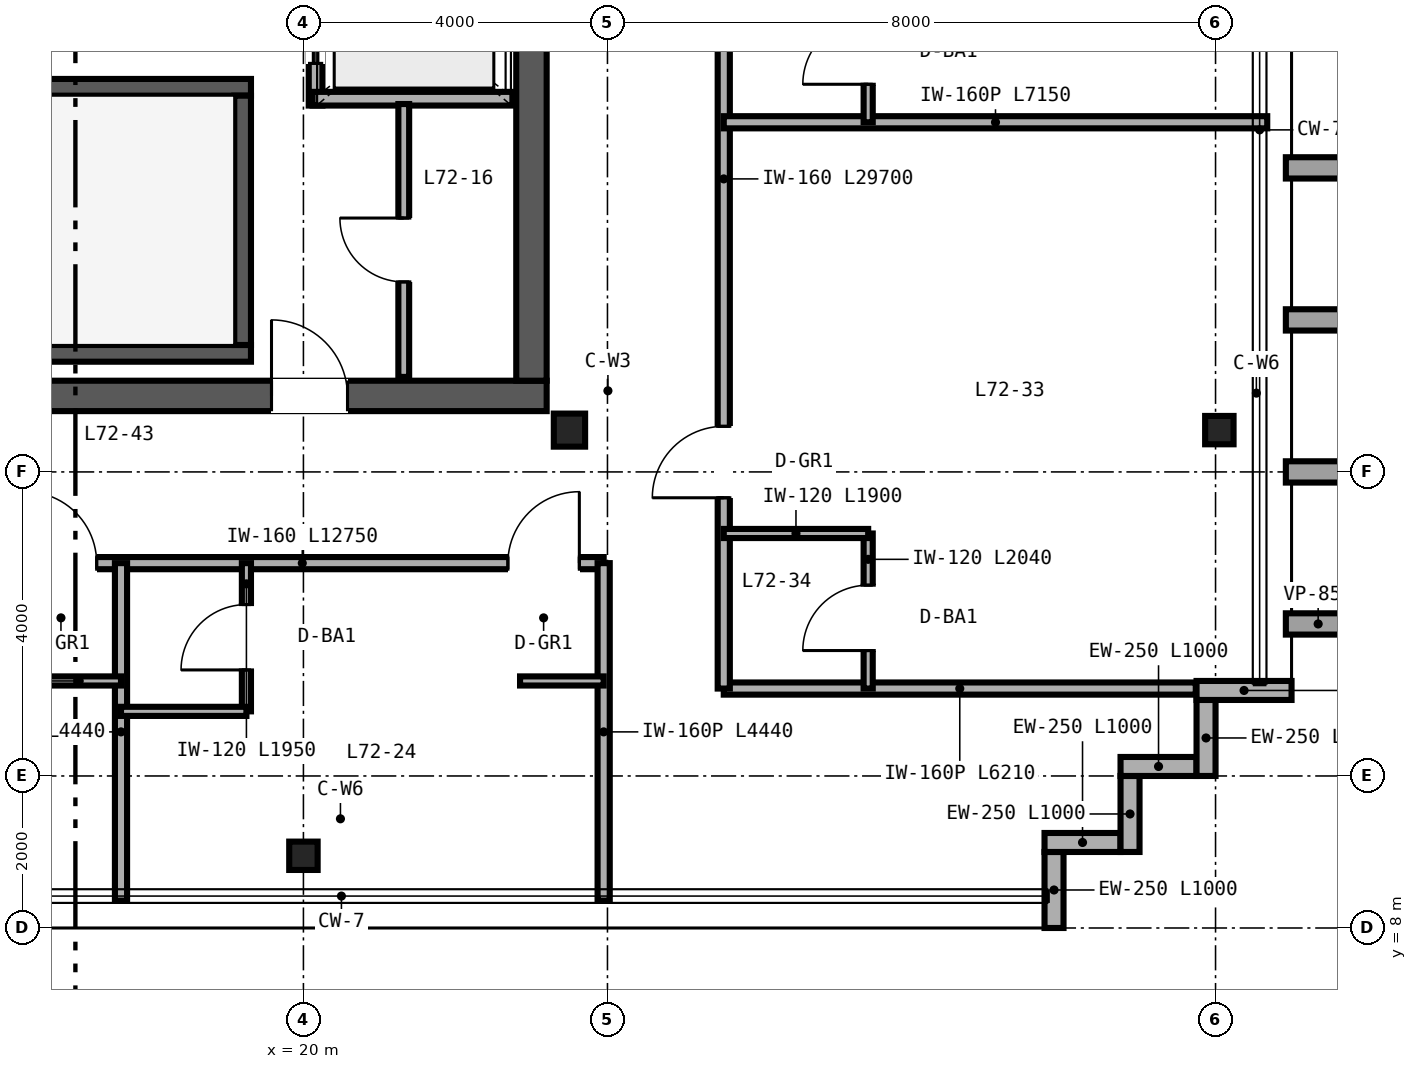
"""IFC4 building model, lengths in metres.
Left out: names, types, materials, properties, quantities, classifications, styles, units other than length and angle.
Written with IfcOpenShell. Run it as: python <this file> out.ifc"""

import sys

from ifc_helpers import new_model, si_unit, direction, frame, frame_2d, origin, origin_2d, place, context, subcontext, project, spatial, rectangle, i_section, extrude, source, transform, mapped, element, fill, save


model = new_model("IFC4")
c1 = context("Model", 3, precision=1e-05, world=origin(), true_north=direction((0.0, 1.0)))
c2 = subcontext(c1, "Body", "Model", "MODEL_VIEW")
j1 = project(units=[si_unit("LENGTHUNIT", "METRE"), si_unit("PLANEANGLEUNIT", "RADIAN")], contexts=[c1])
p1 = place(None, origin())
s1 = spatial("IfcSite", under=j1, at=p1, CompositionType="ELEMENT")
p2 = place(p1, origin())
s2 = spatial("IfcBuilding", under=s1, at=p2, CompositionType="ELEMENT")
p3 = place(p2, frame((0.0, 0.0, 283.2)))
s3 = spatial("IfcBuildingStorey", under=s2, at=p3, CompositionType="ELEMENT", Elevation=283.2)
p4 = place(p3, frame((10.8, 15.0, 0.0), z_axis=(0.0, 0.0, 1.0), x_axis=(1.0, 0.0, 0.0)))
e1 = element("IfcWall", 1, at=p4, inside=s3, PredefinedType="SHEAR", context=c2, shape_type="SweptSolid", body=[
    extrude(rectangle(XDim=12.4, YDim=0.4, at=frame_2d((6.2, 0.0))), origin(), (0.0, 0.0, 1.0), 3.38),
])
p5 = place(p4, frame((8.78, 0.0, 0.0)))
e2 = element("IfcOpeningElement", 2, at=p5, cuts=e1, PredefinedType="OPENING", context=c2, shape_type="SweptSolid", body=[
    extrude(rectangle(XDim=1.0, YDim=2.15, at=frame_2d((0.5, 1.075))), frame((0.0, 0.21, 0.0), z_axis=(0.0, -1.0, 0.0), x_axis=(1.0, 0.0, 0.0)), (0.0, 0.0, 1.0), 0.42),
])
p6 = place(p3, frame((23.0, 15.2, 0.0), z_axis=(0.0, 0.0, 1.0), x_axis=(0.0, 1.0, 0.0)))
e3 = element("IfcWall", 3, at=p6, inside=s3, PredefinedType="SHEAR", context=c2, shape_type="SweptSolid", body=[
    extrude(rectangle(XDim=21.6, YDim=0.4, at=frame_2d((10.8, 0.0))), origin(), (0.0, 0.0, 1.0), 3.38),
])
p7 = place(p3, frame((11.2, 15.56, 0.0), z_axis=(0.0, 0.0, 1.0), x_axis=(1.0, 0.0, 0.0)))
e4 = element("IfcWall", 4, at=p7, inside=s3, PredefinedType="SHEAR", context=c2, shape_type="SweptSolid", body=[
    extrude(rectangle(XDim=8.11, YDim=0.22, at=frame_2d((4.055, 0.0))), origin(), (0.0, 0.0, 1.0), 3.4),
])
p8 = place(p3, frame((11.2, 19.06, 0.0), z_axis=(0.0, 0.0, 1.0), x_axis=(1.0, 0.0, 0.0)))
e5 = element("IfcWall", 5, at=p8, inside=s3, PredefinedType="SHEAR", context=c2, shape_type="SweptSolid", body=[
    extrude(rectangle(XDim=8.11, YDim=0.22, at=frame_2d((4.055, 0.0))), origin(), (0.0, 0.0, 1.0), 3.4),
])
p9 = place(p8, frame((0.72, 0.0, 0.0)))
e6 = element("IfcOpeningElement", 6, at=p9, cuts=e5, PredefinedType="OPENING", context=c2, shape_type="SweptSolid", body=[
    extrude(rectangle(XDim=1.05, YDim=2.15, at=frame_2d((0.525, 1.075))), frame((0.0, 0.12, 0.0), z_axis=(0.0, -1.0, 0.0), x_axis=(1.0, 0.0, 0.0)), (0.0, 0.0, 1.0), 0.24),
])
p10 = place(p3, frame((19.2, 15.67, 0.0), z_axis=(0.0, 0.0, 1.0), x_axis=(0.0, 1.0, 0.0)))
e7 = element("IfcWall", 7, at=p10, inside=s3, PredefinedType="SHEAR", context=c2, shape_type="SweptSolid", body=[
    extrude(rectangle(XDim=3.28, YDim=0.22, at=frame_2d((1.64, 0.0))), origin(), (0.0, 0.0, 1.0), 3.4),
])
m1 = source(origin(), c2, "Body", "SweptSolid", [
    extrude(i_section(OverallWidth=0.412, OverallDepth=0.435, WebThickness=0.036, FlangeThickness=0.057, FilletRadius=0.025, at=origin_2d()), origin(), (0.0, 0.0, 1.0), 3.38),
])
p11 = place(p3, frame((23.5, 14.55, 0.0), z_axis=(0.0, 0.0, 1.0), x_axis=(1.0, 0.0, 0.0)))
e8 = element("IfcColumn", 8, at=p11, inside=s3, PredefinedType="COLUMN", context=c2, shape_type="MappedRepresentation", body=[
    mapped(m1, transform((0.0, 0.0, 0.0), scale=1.0)),
])
m2 = source(origin(), c2, "Body", "SweptSolid", [
    extrude(i_section(OverallWidth=0.374, OverallDepth=0.373, WebThickness=0.016, FlangeThickness=0.026, FilletRadius=0.025, at=origin_2d()), origin(), (0.0, 0.0, 1.0), 3.38),
])
for number, where, z_axis, x_axis in (
    (9, (20.0, 8.95, 0.0), (0.0, 0.0, 1.0), (1.0, 0.0, 0.0)),
    (10, (32.05, 14.55, 0.0), (0.0, 0.0, 1.0), (1.0, 0.0, 0.0)),
):
    element("IfcColumn", number, at=place(p3, frame(where, z_axis=z_axis, x_axis=x_axis)), inside=s3, PredefinedType="COLUMN", context=c2, shape_type="MappedRepresentation", body=[
        mapped(m2, transform((0.0, 0.0, 0.0), scale=1.0)),
    ])
for number, where, z_axis, x_axis in (
    (11, (29.875, 8.0, 0.0), (0.0, 0.0, 1.0), (0.0, 1.0, 0.0)),
    (12, (29.75, 9.125, 0.0), (0.0, 0.0, 1.0), (1.0, 0.0, 0.0)),
    (13, (30.875, 9.0, 0.0), (0.0, 0.0, 1.0), (0.0, 1.0, 0.0)),
    (14, (30.75, 10.125, 0.0), (0.0, 0.0, 1.0), (1.0, 0.0, 0.0)),
    (15, (31.875, 10.0, 0.0), (0.0, 0.0, 1.0), (0.0, 1.0, 0.0)),
):
    element("IfcWall", number, at=place(p3, frame(where, z_axis=z_axis, x_axis=x_axis)), inside=s3, PredefinedType="SOLIDWALL", context=c2, shape_type="SweptSolid", body=[
        extrude(rectangle(XDim=1.0, YDim=0.25, at=frame_2d((0.5, 0.0))), origin(), (0.0, 0.0, 1.0), 3.38),
    ])
p12 = place(p3, frame((31.75, 11.125, 0.0), z_axis=(0.0, 0.0, 1.0), x_axis=(1.0, 0.0, 0.0)))
e16 = element("IfcWall", 16, at=p12, inside=s3, PredefinedType="SOLIDWALL", context=c2, shape_type="SweptSolid", body=[
    extrude(rectangle(XDim=1.25, YDim=0.25, at=frame_2d((0.625, 0.0))), origin(), (0.0, 0.0, 1.0), 3.38),
])
p13 = place(p3, frame((20.16, 18.82, 0.0), z_axis=(0.0, 0.0, 1.0), x_axis=(0.0, 1.0, 0.0)))
e17 = element("IfcWall", 17, at=p13, inside=s3, PredefinedType="SOLIDWALL", context=c2, shape_type="SweptSolid", body=[
    extrude(rectangle(XDim=6.32, YDim=0.18, at=frame_2d((3.16, 0.0))), origin(), (0.0, 0.0, 1.0), 2.48),
])
p14 = place(p13, frame((0.555, 0.0, 0.0)))
e18 = element("IfcOpeningElement", 18, at=p14, cuts=e17, PredefinedType="OPENING", context=c2, shape_type="SweptSolid", body=[
    extrude(rectangle(XDim=1.1, YDim=2.2, at=frame_2d((0.55, 1.1))), frame((0.0, 0.1, 0.0), z_axis=(0.0, -1.0, 0.0), x_axis=(1.0, 0.0, 0.0)), (0.0, 0.0, 1.0), 0.2),
])
p15 = place(p13, frame((2.635, 0.0, 0.0)))
e19 = element("IfcOpeningElement", 19, at=p15, cuts=e17, PredefinedType="OPENING", context=c2, shape_type="SweptSolid", body=[
    extrude(rectangle(XDim=1.1, YDim=2.2, at=frame_2d((0.55, 1.1))), frame((0.0, 0.1, 0.0), z_axis=(0.0, -1.0, 0.0), x_axis=(1.0, 0.0, 0.0)), (0.0, 0.0, 1.0), 0.2),
])
p16 = place(p13, frame((4.69, 0.0, 0.0)))
e20 = element("IfcOpeningElement", 20, at=p16, cuts=e17, PredefinedType="OPENING", context=c2, shape_type="SweptSolid", body=[
    extrude(rectangle(XDim=1.1, YDim=2.2, at=frame_2d((0.55, 1.1))), frame((0.0, 0.1, 0.0), z_axis=(0.0, -1.0, 0.0), x_axis=(1.0, 0.0, 0.0)), (0.0, 0.0, 1.0), 0.2),
])
p17 = place(p3, frame((20.12, 18.91, 0.0), z_axis=(0.0, 0.0, 1.0), x_axis=(1.0, 0.0, 0.0)))
e21 = element("IfcWall", 21, at=p17, inside=s3, PredefinedType="SOLIDWALL", context=c2, shape_type="SweptSolid", body=[
    extrude(rectangle(XDim=2.63, YDim=0.18, at=frame_2d((1.315, 0.0))), origin(), (0.0, 0.0, 1.0), 3.38),
])
p18 = place(p3, frame((21.32, 15.25, 0.0), z_axis=(0.0, 0.0, 1.0), x_axis=(0.0, 1.0, 0.0)))
e22 = element("IfcWall", 22, at=p18, inside=s3, PredefinedType="PARTITIONING", context=c2, shape_type="SweptSolid", body=[
    extrude(rectangle(XDim=3.59, YDim=0.142, at=frame_2d((1.795, 0.0))), origin(), (0.0, 0.0, 1.0), 3.38),
])
p19 = place(p18, frame((1.25, 0.0, 0.0)))
e23 = element("IfcOpeningElement", 23, at=p19, cuts=e22, PredefinedType="OPENING", context=c2, shape_type="SweptSolid", body=[
    extrude(rectangle(XDim=0.84, YDim=2.1, at=frame_2d((0.42, 1.05))), frame((0.0, 0.081, 0.0), z_axis=(0.0, -1.0, 0.0), x_axis=(1.0, 0.0, 0.0)), (0.0, 0.0, 1.0), 0.162),
])
p20 = place(p3, frame((11.2, 12.8, 0.0), z_axis=(0.0, 0.0, 1.0), x_axis=(1.0, 0.0, 0.0)))
e24 = element("IfcWall", 24, at=p20, inside=s3, PredefinedType="PARTITIONING", context=c2, shape_type="SweptSolid", body=[
    extrude(rectangle(XDim=12.75, YDim=0.16, at=frame_2d((6.375, 0.0))), origin(), (0.0, 0.0, 1.0), 3.38),
])
p21 = place(p20, frame((5.14, 0.0, 0.0)))
e25 = element("IfcOpeningElement", 25, at=p21, cuts=e24, PredefinedType="OPENING", context=c2, shape_type="SweptSolid", body=[
    extrude(rectangle(XDim=0.94, YDim=2.15, at=frame_2d((0.47, 1.075))), frame((0.0, 0.09, 0.0), z_axis=(0.0, -1.0, 0.0), x_axis=(1.0, 0.0, 0.0)), (0.0, 0.0, 1.0), 0.18),
])
p22 = place(p20, frame((11.49, 0.0, 0.0)))
e26 = element("IfcOpeningElement", 26, at=p22, cuts=e24, PredefinedType="OPENING", context=c2, shape_type="SweptSolid", body=[
    extrude(rectangle(XDim=0.94, YDim=2.15, at=frame_2d((0.47, 1.075))), frame((0.0, 0.09, 0.0), z_axis=(0.0, -1.0, 0.0), x_axis=(1.0, 0.0, 0.0)), (0.0, 0.0, 1.0), 0.18),
])
p23 = place(p3, frame((23.95, 8.36, 0.0), z_axis=(0.0, 0.0, 1.0), x_axis=(0.0, 1.0, 0.0)))
e27 = element("IfcWall", 27, at=p23, inside=s3, PredefinedType="PARTITIONING", context=c2, shape_type="SweptSolid", body=[
    extrude(rectangle(XDim=4.44, YDim=0.16, at=frame_2d((2.22, 0.0))), origin(), (0.0, 0.0, 1.0), 3.38),
])
p24 = place(p3, frame((17.6, 8.36, 0.0), z_axis=(0.0, 0.0, 1.0), x_axis=(0.0, 1.0, 0.0)))
e28 = element("IfcWall", 28, at=p24, inside=s3, PredefinedType="PARTITIONING", context=c2, shape_type="SweptSolid", body=[
    extrude(rectangle(XDim=4.44, YDim=0.16, at=frame_2d((2.22, 0.0))), origin(), (0.0, 0.0, 1.0), 2.687),
])
p25 = place(p3, frame((16.5, 11.25, 0.0), z_axis=(0.0, 0.0, 1.0), x_axis=(1.0, 0.0, 0.0)))
e29 = element("IfcWall", 29, at=p25, inside=s3, PredefinedType="PARTITIONING", context=c2, shape_type="SweptSolid", body=[
    extrude(rectangle(XDim=1.1, YDim=0.12, at=frame_2d((0.55, 0.0))), origin(), (0.0, 0.0, 1.0), 3.38),
])
p26 = place(p3, frame((19.25, 10.85, 0.0), z_axis=(0.0, 0.0, 1.0), x_axis=(0.0, 1.0, 0.0)))
e30 = element("IfcWall", 30, at=p26, inside=s3, PredefinedType="PARTITIONING", context=c2, shape_type="SweptSolid", body=[
    extrude(rectangle(XDim=1.95, YDim=0.12, at=frame_2d((0.975, 0.0))), origin(), (0.0, 0.0, 1.0), 3.38),
])
p27 = place(p26, frame((0.545, 0.0, 0.0)))
e31 = element("IfcOpeningElement", 31, at=p27, cuts=e30, PredefinedType="OPENING", context=c2, shape_type="SweptSolid", body=[
    extrude(rectangle(XDim=0.86, YDim=2.1, at=frame_2d((0.43, 1.05))), frame((0.0, 0.07, 0.0), z_axis=(0.0, -1.0, 0.0), x_axis=(1.0, 0.0, 0.0)), (0.0, 0.0, 1.0), 0.14),
])
p28 = place(p3, frame((17.6, 10.85, 0.0), z_axis=(0.0, 0.0, 1.0), x_axis=(1.0, 0.0, 0.0)))
e32 = element("IfcWall", 32, at=p28, inside=s3, PredefinedType="PARTITIONING", context=c2, shape_type="SweptSolid", body=[
    extrude(rectangle(XDim=1.65, YDim=0.12, at=frame_2d((0.825, 0.0))), origin(), (0.0, 0.0, 1.0), 3.38),
])
p29 = place(p3, frame((22.85, 11.25, 0.0), z_axis=(0.0, 0.0, 1.0), x_axis=(1.0, 0.0, 0.0)))
e33 = element("IfcWall", 33, at=p29, inside=s3, PredefinedType="PARTITIONING", context=c2, shape_type="SweptSolid", body=[
    extrude(rectangle(XDim=1.1, YDim=0.12, at=frame_2d((0.55, 0.0))), origin(), (0.0, 0.0, 1.0), 3.38),
])
p30 = place(p3, frame((25.53, 11.15, 0.0), z_axis=(0.0, 0.0, 1.0), x_axis=(1.0, 0.0, 0.0)))
e34 = element("IfcWall", 34, at=p30, inside=s3, PredefinedType="PARTITIONING", context=c2, shape_type="SweptSolid", body=[
    extrude(rectangle(XDim=6.21, YDim=0.16, at=frame_2d((3.105, 0.0))), origin(), (0.0, 0.0, 1.0), 3.38),
])
p31 = place(p3, frame((25.53, 11.15, 0.0), z_axis=(0.0, 0.0, 1.0), x_axis=(0.0, 1.0, 0.0)))
e35 = element("IfcWall", 35, at=p31, inside=s3, PredefinedType="PARTITIONING", context=c2, shape_type="SweptSolid", body=[
    extrude(rectangle(XDim=29.7, YDim=0.16, at=frame_2d((14.85, 0.0))), origin(), (0.0, 0.0, 1.0), 2.524),
])
p32 = place(p31, frame((2.51, 0.0, 0.0)))
e36 = element("IfcOpeningElement", 36, at=p32, cuts=e35, PredefinedType="OPENING", context=c2, shape_type="SweptSolid", body=[
    extrude(rectangle(XDim=0.94, YDim=2.15, at=frame_2d((0.47, 1.075))), frame((0.0, 0.09, 0.0), z_axis=(0.0, -1.0, 0.0), x_axis=(1.0, 0.0, 0.0)), (0.0, 0.0, 1.0), 0.18),
])
p33 = place(p31, frame((9.96, 0.0, 0.0)))
e37 = element("IfcOpeningElement", 37, at=p33, cuts=e35, PredefinedType="OPENING", context=c2, shape_type="SweptSolid", body=[
    extrude(rectangle(XDim=0.94, YDim=2.15, at=frame_2d((0.47, 1.075))), frame((0.0, 0.09, 0.0), z_axis=(0.0, -1.0, 0.0), x_axis=(1.0, 0.0, 0.0)), (0.0, 0.0, 1.0), 0.18),
])
p34 = place(p31, frame((17.36, 0.0, 0.0)))
e38 = element("IfcOpeningElement", 38, at=p34, cuts=e35, PredefinedType="OPENING", context=c2, shape_type="SweptSolid", body=[
    extrude(rectangle(XDim=0.94, YDim=2.15, at=frame_2d((0.47, 1.075))), frame((0.0, 0.09, 0.0), z_axis=(0.0, -1.0, 0.0), x_axis=(1.0, 0.0, 0.0)), (0.0, 0.0, 1.0), 0.18),
])
p35 = place(p31, frame((24.76, 0.0, 0.0)))
e39 = element("IfcOpeningElement", 39, at=p35, cuts=e35, PredefinedType="OPENING", context=c2, shape_type="SweptSolid", body=[
    extrude(rectangle(XDim=0.94, YDim=2.15, at=frame_2d((0.47, 1.075))), frame((0.0, 0.09, 0.0), z_axis=(0.0, -1.0, 0.0), x_axis=(1.0, 0.0, 0.0)), (0.0, 0.0, 1.0), 0.18),
])
p36 = place(p3, frame((25.53, 18.6, 0.0), z_axis=(0.0, 0.0, 1.0), x_axis=(1.0, 0.0, 0.0)))
e40 = element("IfcWall", 40, at=p36, inside=s3, PredefinedType="PARTITIONING", context=c2, shape_type="SweptSolid", body=[
    extrude(rectangle(XDim=7.15, YDim=0.16, at=frame_2d((3.575, 0.0))), origin(), (0.0, 0.0, 1.0), 2.601),
])
p37 = place(p3, frame((27.43, 11.15, 0.0), z_axis=(0.0, 0.0, 1.0), x_axis=(0.0, 1.0, 0.0)))
e41 = element("IfcWall", 41, at=p37, inside=s3, PredefinedType="PARTITIONING", context=c2, shape_type="SweptSolid", body=[
    extrude(rectangle(XDim=2.04, YDim=0.12, at=frame_2d((1.02, 0.0))), origin(), (0.0, 0.0, 1.0), 3.38),
])
p38 = place(p37, frame((0.5, 0.0, 0.0)))
e42 = element("IfcOpeningElement", 42, at=p38, cuts=e41, PredefinedType="OPENING", context=c2, shape_type="SweptSolid", body=[
    extrude(rectangle(XDim=0.86, YDim=2.1, at=frame_2d((0.43, 1.05))), frame((0.0, 0.07, 0.0), z_axis=(0.0, -1.0, 0.0), x_axis=(1.0, 0.0, 0.0)), (0.0, 0.0, 1.0), 0.14),
])
p39 = place(p3, frame((25.53, 13.19, 0.0), z_axis=(0.0, 0.0, 1.0), x_axis=(1.0, 0.0, 0.0)))
e43 = element("IfcWall", 43, at=p39, inside=s3, PredefinedType="PARTITIONING", context=c2, shape_type="SweptSolid", body=[
    extrude(rectangle(XDim=1.9, YDim=0.12, at=frame_2d((0.95, 0.0))), origin(), (0.0, 0.0, 1.0), 3.38),
])
p40 = place(p3, frame((27.43, 18.6, 0.0), z_axis=(0.0, 0.0, 1.0), x_axis=(0.0, 1.0, 0.0)))
e44 = element("IfcWall", 44, at=p40, inside=s3, PredefinedType="PARTITIONING", context=c2, shape_type="SweptSolid", body=[
    extrude(rectangle(XDim=2.04, YDim=0.12, at=frame_2d((1.02, 0.0))), origin(), (0.0, 0.0, 1.0), 3.38),
])
p41 = place(p40, frame((0.5, 0.0, 0.0)))
e45 = element("IfcOpeningElement", 45, at=p41, cuts=e44, PredefinedType="OPENING", context=c2, shape_type="SweptSolid", body=[
    extrude(rectangle(XDim=0.86, YDim=2.1, at=frame_2d((0.43, 1.05))), frame((0.0, 0.07, 0.0), z_axis=(0.0, -1.0, 0.0), x_axis=(1.0, 0.0, 0.0)), (0.0, 0.0, 1.0), 0.14),
])
m3 = source(origin(), c2, "Body", "SweptSolid", [
    extrude(rectangle(XDim=1.1, YDim=2.2, at=frame_2d((0.55, 1.1))), frame((0.0, 0.025, 0.0), z_axis=(0.0, -1.0, 0.0), x_axis=(1.0, 0.0, 0.0)), (0.0, 0.0, 1.0), 0.05),
])
p42 = place(p14, origin())
e46 = element("IfcDoor", 46, at=p42, inside=s3, OperationType="DOUBLE_DOOR_SLIDING", PredefinedType="DOOR", context=c2, shape_type="MappedRepresentation", body=[
    mapped(m3, transform((0.0, 0.0, 0.0), scale=1.0)),
])
fill(e18, e46)
m4 = source(origin(), c2, "Body", "SweptSolid", [
    extrude(rectangle(XDim=0.84, YDim=2.1, at=frame_2d((0.42, 1.05))), frame((0.0, 0.025, 0.0), z_axis=(0.0, -1.0, 0.0), x_axis=(1.0, 0.0, 0.0)), (0.0, 0.0, 1.0), 0.05),
])
p43 = place(p19, origin())
e47 = element("IfcDoor", 47, at=p43, inside=s3, OperationType="SINGLE_SWING_RIGHT", PredefinedType="DOOR", context=c2, shape_type="MappedRepresentation", body=[
    mapped(m4, transform((0.0, 0.0, 0.0), scale=1.0)),
])
fill(e23, e47)
m5 = source(origin(), c2, "Body", "SweptSolid", [
    extrude(rectangle(XDim=1.0, YDim=2.15, at=frame_2d((0.5, 1.075))), frame((0.0, 0.025, 0.0), z_axis=(0.0, -1.0, 0.0), x_axis=(1.0, 0.0, 0.0)), (0.0, 0.0, 1.0), 0.05),
])
p44 = place(p5, origin())
e48 = element("IfcDoor", 48, at=p44, inside=s3, OperationType="SINGLE_SWING_LEFT", PredefinedType="DOOR", context=c2, shape_type="MappedRepresentation", body=[
    mapped(m5, transform((0.0, 0.0, 0.0), scale=1.0)),
])
fill(e2, e48)
m6 = source(origin(), c2, "Body", "SweptSolid", [
    extrude(rectangle(XDim=0.86, YDim=2.1, at=frame_2d((0.43, 1.05))), frame((0.0, 0.025, 0.0), z_axis=(0.0, -1.0, 0.0), x_axis=(1.0, 0.0, 0.0)), (0.0, 0.0, 1.0), 0.05),
])
p45 = place(p27, origin())
e49 = element("IfcDoor", 49, at=p45, inside=s3, OperationType="SINGLE_SWING_LEFT", PredefinedType="DOOR", context=c2, shape_type="MappedRepresentation", body=[
    mapped(m6, transform((0.0, 0.0, 0.0), scale=1.0)),
])
fill(e31, e49)
m7 = source(origin(), c2, "Body", "SweptSolid", [
    extrude(rectangle(XDim=0.94, YDim=2.15, at=frame_2d((0.47, 1.075))), frame((0.0, 0.025, 0.0), z_axis=(0.0, -1.0, 0.0), x_axis=(1.0, 0.0, 0.0)), (0.0, 0.0, 1.0), 0.05),
])
p46 = place(p21, origin())
e50 = element("IfcDoor", 50, at=p46, inside=s3, OperationType="SINGLE_SWING_LEFT", PredefinedType="DOOR", context=c2, shape_type="MappedRepresentation", body=[
    mapped(m7, transform((0.0, 0.0, 0.0), scale=1.0)),
])
fill(e25, e50)
p47 = place(p22, origin())
e51 = element("IfcDoor", 51, at=p47, inside=s3, OperationType="SINGLE_SWING_RIGHT", PredefinedType="DOOR", context=c2, shape_type="MappedRepresentation", body=[
    mapped(m7, transform((0.0, 0.0, 0.0), scale=1.0)),
])
fill(e26, e51)
p48 = place(p38, origin())
e52 = element("IfcDoor", 52, at=p48, inside=s3, OperationType="SINGLE_SWING_LEFT", PredefinedType="DOOR", context=c2, shape_type="MappedRepresentation", body=[
    mapped(m6, transform((0.0, 0.0, 0.0), scale=1.0)),
])
fill(e42, e52)
p49 = place(p32, origin())
e53 = element("IfcDoor", 53, at=p49, inside=s3, OperationType="SINGLE_SWING_LEFT", PredefinedType="DOOR", context=c2, shape_type="MappedRepresentation", body=[
    mapped(m7, transform((0.0, 0.0, 0.0), scale=1.0)),
])
fill(e36, e53)
p50 = place(p41, origin())
e54 = element("IfcDoor", 54, at=p50, inside=s3, OperationType="SINGLE_SWING_LEFT", PredefinedType="DOOR", context=c2, shape_type="MappedRepresentation", body=[
    mapped(m6, transform((0.0, 0.0, 0.0), scale=1.0)),
])
fill(e45, e54)
save(model, sys.argv[1])
